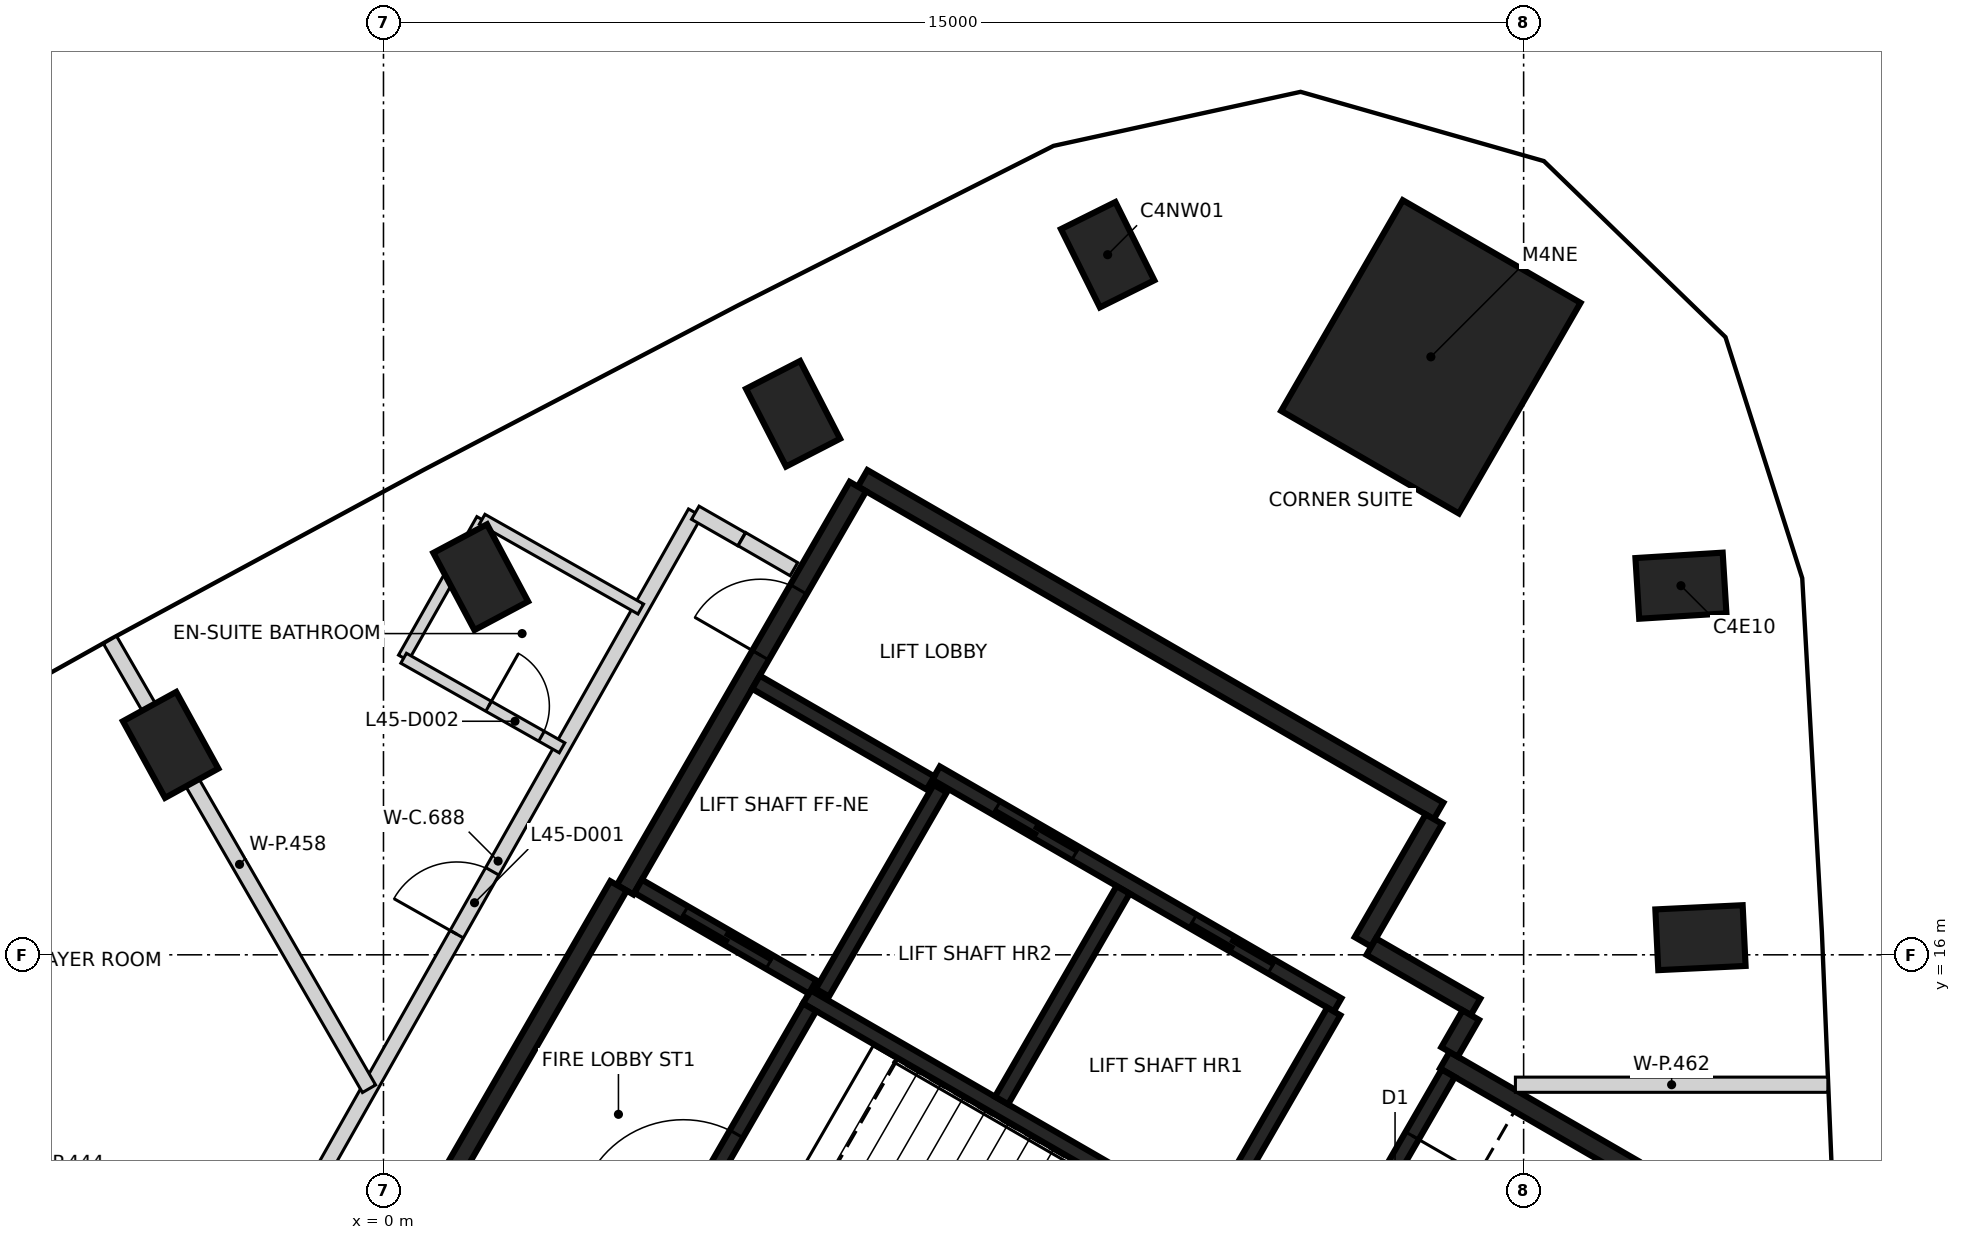
"""IFC4 building model, lengths in metres.
Left out: names, types, materials, properties, quantities, classifications, styles, units other than length and angle.
Written with IfcOpenShell. Run it as: python <this file> out.ifc"""

import sys

from ifc_helpers import new_model, si_unit, direction, frame, frame_2d, origin, origin_2d, place, context, subcontext, project, spatial, rectangle, extrude, element, fill, save


model = new_model("IFC4")
c1 = context("Model", 3, precision=1e-05, world=origin(), true_north=direction((0.0, 1.0)))
c2 = subcontext(c1, "Body", "Model", "MODEL_VIEW")
j1 = project(units=[si_unit("LENGTHUNIT", "METRE"), si_unit("PLANEANGLEUNIT", "RADIAN")], contexts=[c1])
p1 = place(None, origin())
s1 = spatial("IfcSite", under=j1, at=p1, CompositionType="ELEMENT")
p2 = place(p1, origin())
s2 = spatial("IfcBuilding", under=s1, at=p2, CompositionType="ELEMENT")
p3 = place(p2, frame((0.0, 0.0, 182.8)))
s3 = spatial("IfcBuildingStorey", under=s2, at=p3, CompositionType="ELEMENT", Elevation=182.8)
for number, where, z_axis, x_axis in (
    (1, (17.326, 16.226, -0.35), (0.0, 0.0, 1.0), (0.999, 0.048, 0.0)),
    (2, (17.07, 20.856, -0.35), (0.0, 0.0, 1.0), (0.998, 0.062, 0.0)),
    (3, (9.527, 25.211, -0.35), (0.0, 0.0, 1.0), (-0.445, 0.895, 0.0)),
    (4, (5.388, 23.118, -0.35), (0.0, 0.0, 1.0), (-0.458, 0.889, 0.0)),
    (5, (1.279, 20.968, -0.35), (0.0, 0.0, 1.0), (-0.47, 0.883, 0.0)),
    (6, (-2.8, 18.762, -0.35), (0.0, 0.0, 1.0), (-0.482, 0.876, 0.0)),
):
    element("IfcColumn", number, at=place(p3, frame(where, z_axis=z_axis, x_axis=x_axis)), inside=s3, PredefinedType="COLUMN", context=c2, shape_type="SweptSolid", body=[
        extrude(rectangle(XDim=1.15, YDim=0.8, at=origin_2d()), origin(), (0.0, 0.0, 1.0), 3.6),
    ])
p4 = place(p3, frame((13.78, 23.867, -0.35), z_axis=(0.0, 0.0, 1.0), x_axis=(0.5, 0.866025403784, 0.0)))
e7 = element("IfcColumn", 7, at=p4, inside=s3, PredefinedType="COLUMN", context=c2, shape_type="SweptSolid", body=[
    extrude(rectangle(XDim=3.2, YDim=2.7, at=origin_2d()), origin(), (0.0, 0.0, 1.0), 3.6),
])
p5 = place(p3, frame((6.304, 22.269, 0.0), z_axis=(0.0, 0.0, 1.0), x_axis=(0.866022959057, -0.500004234368, 0.0)))
e8 = element("IfcWall", 8, at=p5, inside=s3, PredefinedType="SHEAR", context=c2, shape_type="SweptSolid", body=[
    extrude(rectangle(XDim=8.75, YDim=0.25, at=frame_2d((4.375, 0.0))), origin(), (0.0, 0.0, 1.0), 3.25),
])
p6 = place(p3, frame((3.179, 16.856, 0.0), z_axis=(0.0, 0.0, 1.0), x_axis=(0.500001955336, 0.866024274868, 0.0)))
e9 = element("IfcWall", 9, at=p6, inside=s3, PredefinedType="SHEAR", context=c2, shape_type="SweptSolid", body=[
    extrude(rectangle(XDim=6.125, YDim=0.25, at=frame_2d((3.062, 0.0))), origin(), (0.0, 0.0, 1.0), 3.25),
])
p7 = place(p6, frame((3.563, 0.0, 0.0)))
e10 = element("IfcOpeningElement", 10, at=p7, cuts=e9, PredefinedType="OPENING", context=c2, shape_type="SweptSolid", body=[
    extrude(rectangle(XDim=1.0, YDim=2.1, at=frame_2d((0.5, 1.05))), frame((0.0, 0.135, 0.0), z_axis=(0.0, -1.0, 0.0), x_axis=(1.0, 0.0, 0.0)), (0.0, 0.0, 1.0), 0.27),
])
p8 = place(p3, frame((0.48, 12.381, 0.0), z_axis=(0.0, 0.0, 1.0), x_axis=(0.49999885962, 0.866026062182, 0.0)))
e11 = element("IfcWall", 11, at=p8, inside=s3, PredefinedType="SHEAR", context=c2, shape_type="SweptSolid", body=[
    extrude(rectangle(XDim=5.225, YDim=0.25, at=frame_2d((2.612, 0.0))), origin(), (0.0, 0.0, 1.0), 3.25),
])
p9 = place(p3, frame((13.963, 14.614, 0.0), z_axis=(0.0, 0.0, 1.0), x_axis=(0.866042235819, -0.499970844928, 0.0)))
e12 = element("IfcWall", 12, at=p9, inside=s3, PredefinedType="SHEAR", context=c2, shape_type="SweptSolid", body=[
    extrude(rectangle(XDim=2.865, YDim=0.25, at=frame_2d((1.432, 0.0))), origin(), (0.0, 0.0, 1.0), 3.25),
])
p10 = place(p3, frame((13.819, 17.785, 0.0), z_axis=(0.0, 0.0, 1.0), x_axis=(-0.500039802285, -0.866002422705, 0.0)))
e13 = element("IfcWall", 13, at=p10, inside=s3, PredefinedType="SHEAR", context=c2, shape_type="SweptSolid", body=[
    extrude(rectangle(XDim=1.865, YDim=0.25, at=frame_2d((0.932, 0.0))), origin(), (0.0, 0.0, 1.0), 3.25),
])
p11 = place(p3, frame((12.995, 16.108, 0.0), z_axis=(0.0, 0.0, 1.0), x_axis=(0.866044474677, -0.49996696679, 0.0)))
e14 = element("IfcWall", 14, at=p11, inside=s3, PredefinedType="SHEAR", context=c2, shape_type="SweptSolid", body=[
    extrude(rectangle(XDim=1.584, YDim=0.25, at=frame_2d((0.792, 0.0))), origin(), (0.0, 0.0, 1.0), 3.25),
])
p12 = place(p3, frame((14.305, 15.207, 0.0), z_axis=(0.0, 0.0, 1.0), x_axis=(-0.499848422343, -0.866112899501, 0.0)))
e15 = element("IfcWall", 15, at=p12, inside=s3, PredefinedType="SHEAR", context=c2, shape_type="SweptSolid", body=[
    extrude(rectangle(XDim=0.559, YDim=0.25, at=frame_2d((0.28, 0.0))), origin(), (0.0, 0.0, 1.0), 3.25),
])
p13 = place(p3, frame((12.552, 15.342, 0.0), z_axis=(0.0, 0.0, 1.0), x_axis=(-0.866030299012, 0.499991521122, 0.0)))
e16 = element("IfcWall", 16, at=p13, inside=s3, PredefinedType="SHEAR", context=c2, shape_type="SweptSolid", body=[
    extrude(rectangle(XDim=6.1, YDim=0.2, at=frame_2d((3.05, 0.0))), origin(), (0.0, 0.0, 1.0), 3.25),
])
p14 = place(p13, frame((1.0, 0.0, 0.0)))
e17 = element("IfcOpeningElement", 17, at=p14, cuts=e16, PredefinedType="OPENING", context=c2, shape_type="SweptSolid", body=[
    extrude(rectangle(XDim=1.2, YDim=2.1, at=frame_2d((0.6, 1.05))), frame((0.0, 0.11, 0.0), z_axis=(0.0, -1.0, 0.0), x_axis=(1.0, 0.0, 0.0)), (0.0, 0.0, 1.0), 0.22),
])
p15 = place(p13, frame((3.982, 0.0, 0.0)))
e18 = element("IfcOpeningElement", 18, at=p15, cuts=e16, PredefinedType="OPENING", context=c2, shape_type="SweptSolid", body=[
    extrude(rectangle(XDim=1.2, YDim=2.1, at=frame_2d((0.6, 1.05))), frame((0.0, 0.11, 0.0), z_axis=(0.0, -1.0, 0.0), x_axis=(1.0, 0.0, 0.0)), (0.0, 0.0, 1.0), 0.22),
])
p16 = place(p3, frame((10.743, 12.46, 0.0), z_axis=(0.0, 0.0, 1.0), x_axis=(-0.866018848283, 0.500011354289, 0.0)))
e19 = element("IfcWall", 19, at=p16, inside=s3, PredefinedType="SHEAR", context=c2, shape_type="SweptSolid", body=[
    extrude(rectangle(XDim=5.974, YDim=0.2, at=frame_2d((2.987, 0.0))), origin(), (0.0, 0.0, 1.0), 3.25),
])
p17 = place(p3, frame((3.057, 10.895, 0.0), z_axis=(0.0, 0.0, 1.0), x_axis=(0.500027839223, 0.866009330205, 0.0)))
e20 = element("IfcWall", 20, at=p17, inside=s3, PredefinedType="SHEAR", context=c2, shape_type="SweptSolid", body=[
    extrude(rectangle(XDim=5.098, YDim=0.2, at=frame_2d((2.549, 0.0))), origin(), (0.0, 0.0, 1.0), 3.25),
])
p18 = place(p17, frame((1.774, 0.0, 0.0)))
e21 = element("IfcOpeningElement", 21, at=p18, cuts=e20, PredefinedType="OPENING", context=c2, shape_type="SweptSolid", body=[
    extrude(rectangle(XDim=1.4, YDim=2.1, at=frame_2d((0.7, 1.05))), frame((0.0, 0.11, 0.0), z_axis=(0.0, -1.0, 0.0), x_axis=(1.0, 0.0, 0.0)), (0.0, 0.0, 1.0), 0.22),
])
p19 = place(p3, frame((8.132, 14.084, 0.0), z_axis=(0.0, 0.0, 1.0), x_axis=(0.500030834389, 0.86600760081, 0.0)))
e22 = element("IfcWall", 22, at=p19, inside=s3, PredefinedType="SHEAR", context=c2, shape_type="SweptSolid", body=[
    extrude(rectangle(XDim=3.198, YDim=0.2, at=frame_2d((1.599, 0.0))), origin(), (0.0, 0.0, 1.0), 3.25),
])
p20 = place(p3, frame((14.008, 14.442, 0.0), z_axis=(0.0, 0.0, 1.0), x_axis=(-0.499986818241, -0.866033014143, 0.0)))
e23 = element("IfcWall", 23, at=p20, inside=s3, PredefinedType="SHEAR", context=c2, shape_type="SweptSolid", body=[
    extrude(rectangle(XDim=2.798, YDim=0.2, at=frame_2d((1.399, 0.0))), origin(), (0.0, 0.0, 1.0), 3.25),
])
p21 = place(p20, frame((0.949, 0.0, 0.0)))
e24 = element("IfcOpeningElement", 24, at=p21, cuts=e23, PredefinedType="OPENING", context=c2, shape_type="SweptSolid", body=[
    extrude(rectangle(XDim=0.9, YDim=2.1, at=frame_2d((0.45, 1.05))), frame((0.0, 0.11, 0.0), z_axis=(0.0, -1.0, 0.0), x_axis=(1.0, 0.0, 0.0)), (0.0, 0.0, 1.0), 0.22),
])
p22 = place(p3, frame((12.502, 15.255, 0.0), z_axis=(0.0, 0.0, 1.0), x_axis=(-0.499965018551, -0.866045599391, 0.0)))
e25 = element("IfcWall", 25, at=p22, inside=s3, PredefinedType="SHEAR", context=c2, shape_type="SweptSolid", body=[
    extrude(rectangle(XDim=2.759, YDim=0.2, at=frame_2d((1.379, 0.0))), origin(), (0.0, 0.0, 1.0), 3.25),
])
p23 = place(p3, frame((7.324, 18.187, 0.0), z_axis=(0.0, 0.0, 1.0), x_axis=(-0.499967891604, -0.866043940782, 0.0)))
e26 = element("IfcWall", 26, at=p23, inside=s3, PredefinedType="SHEAR", context=c2, shape_type="SweptSolid", body=[
    extrude(rectangle(XDim=3.1, YDim=0.2, at=frame_2d((1.55, 0.0))), origin(), (0.0, 0.0, 1.0), 3.25),
])
p24 = place(p3, frame((5.646, 15.576, 0.0), z_axis=(0.0, 0.0, 1.0), x_axis=(-0.866018407898, 0.500012117035, 0.0)))
e27 = element("IfcWall", 27, at=p24, inside=s3, PredefinedType="SHEAR", context=c2, shape_type="SweptSolid", body=[
    extrude(rectangle(XDim=2.651, YDim=0.2, at=frame_2d((1.325, 0.0))), origin(), (0.0, 0.0, 1.0), 3.25),
])
p25 = place(p24, frame((0.652, 0.0, 0.0)))
e28 = element("IfcOpeningElement", 28, at=p25, cuts=e27, PredefinedType="OPENING", context=c2, shape_type="SweptSolid", body=[
    extrude(rectangle(XDim=1.3, YDim=2.1, at=frame_2d((0.65, 1.05))), frame((0.0, 0.11, 0.0), z_axis=(0.0, -1.0, 0.0), x_axis=(1.0, 0.0, 0.0)), (0.0, 0.0, 1.0), 0.22),
])
p26 = place(p3, frame((7.196, 18.26, 0.0), z_axis=(0.0, 0.0, 1.0), x_axis=(-0.866018407898, 0.500012117035, 0.0)))
e29 = element("IfcWall", 29, at=p26, inside=s3, PredefinedType="SHEAR", context=c2, shape_type="SweptSolid", body=[
    extrude(rectangle(XDim=2.651, YDim=0.2, at=frame_2d((1.325, 0.0))), origin(), (0.0, 0.0, 1.0), 3.25),
])
p27 = place(p3, frame((-1.084, 12.65, 0.0), z_axis=(0.0, 0.0, 1.0), x_axis=(0.492271892014, 0.870441488173, 0.0)))
e30 = element("IfcWall", 30, at=p27, inside=s3, PredefinedType="PARTITIONING", context=c2, shape_type="SweptSolid", body=[
    extrude(rectangle(XDim=10.531, YDim=0.2, at=frame_2d((5.266, 0.0))), origin(), (0.0, 0.0, 1.0), 3.25),
])
p28 = place(p27, frame((4.161, 0.0, 0.0)))
e31 = element("IfcOpeningElement", 31, at=p28, cuts=e30, PredefinedType="OPENING", context=c2, shape_type="SweptSolid", body=[
    extrude(rectangle(XDim=0.95, YDim=2.1, at=frame_2d((0.475, 1.05))), frame((0.0, 0.11, 0.0), z_axis=(0.0, -1.0, 0.0), x_axis=(1.0, 0.0, 0.0)), (0.0, 0.0, 1.0), 0.22),
])
p29 = place(p3, frame((4.102, 21.816, 0.0), z_axis=(0.0, 0.0, 1.0), x_axis=(0.867664502326, -0.497150189986, 0.0)))
e32 = element("IfcWall", 32, at=p29, inside=s3, PredefinedType="PARTITIONING", context=c2, shape_type="SweptSolid", body=[
    extrude(rectangle(XDim=0.702, YDim=0.2, at=frame_2d((0.351, 0.0))), origin(), (0.0, 0.0, 1.0), 3.25),
])
p30 = place(p3, frame((4.716, 21.468, 0.0), z_axis=(0.0, 0.0, 1.0), x_axis=(0.865912682783, -0.500195187698, 0.0)))
e33 = element("IfcWall", 33, at=p30, inside=s3, PredefinedType="PARTITIONING", context=c2, shape_type="SweptSolid", body=[
    extrude(rectangle(XDim=0.79, YDim=0.2, at=frame_2d((0.395, 0.0))), origin(), (0.0, 0.0, 1.0), 3.25),
])
p31 = place(p3, frame((-7.646, 17.879, 0.0), z_axis=(0.0, 0.0, 1.0), x_axis=(0.500047691386, -0.865997867399, 0.0)))
e34 = element("IfcWall", 34, at=p31, inside=s3, PredefinedType="PARTITIONING", context=c2, shape_type="SweptSolid", body=[
    extrude(rectangle(XDim=11.306, YDim=0.2, at=frame_2d((5.653, 0.0))), origin(), (0.0, 0.0, 1.0), 3.25),
])
p32 = place(p3, frame((-3.597, 20.142, 0.0), z_axis=(0.0, 0.0, 1.0), x_axis=(0.499864035625, -0.866103888623, 0.0)))
e35 = element("IfcWall", 35, at=p32, inside=s3, PredefinedType="PARTITIONING", context=c2, shape_type="SweptSolid", body=[
    extrude(rectangle(XDim=6.817, YDim=0.2, at=frame_2d((3.408, 0.0))), origin(), (0.0, 0.0, 1.0), 3.25),
])
p33 = place(p3, frame((14.892, 14.291, 0.0), z_axis=(0.0, 0.0, 1.0), x_axis=(1.0, 0.0, 0.0)))
e36 = element("IfcWall", 36, at=p33, inside=s3, PredefinedType="PARTITIONING", context=c2, shape_type="SweptSolid", body=[
    extrude(rectangle(XDim=4.111, YDim=0.2, at=frame_2d((2.055, 0.0))), origin(), (0.0, 0.0, 1.0), 2.35),
])
p34 = place(p3, frame((0.263, 19.906, 0.0), z_axis=(0.0, 0.0, 1.0), x_axis=(0.492479898936, 0.870323818555, 0.0)))
e37 = element("IfcWall", 37, at=p34, inside=s3, PredefinedType="PARTITIONING", context=c2, shape_type="SweptSolid", body=[
    extrude(rectangle(XDim=2.094, YDim=0.15, at=frame_2d((1.047, 0.0))), origin(), (0.0, 0.0, 1.0), 2.35),
])
p35 = place(p3, frame((0.265, 19.902, 0.0), z_axis=(0.0, 0.0, 1.0), x_axis=(0.870355792391, -0.492423389627, 0.0)))
e38 = element("IfcWall", 38, at=p35, inside=s3, PredefinedType="PARTITIONING", context=c2, shape_type="SweptSolid", body=[
    extrude(rectangle(XDim=2.395, YDim=0.15, at=frame_2d((1.197, 0.0))), origin(), (0.0, 0.0, 1.0), 3.25),
])
p36 = place(p35, frame((1.284, 0.0, 0.0)))
e39 = element("IfcOpeningElement", 39, at=p36, cuts=e38, PredefinedType="OPENING", context=c2, shape_type="SweptSolid", body=[
    extrude(rectangle(XDim=0.8, YDim=2.1, at=frame_2d((0.4, 1.05))), frame((0.0, 0.085, 0.0), z_axis=(0.0, -1.0, 0.0), x_axis=(1.0, 0.0, 0.0)), (0.0, 0.0, 1.0), 0.17),
])
p37 = place(p3, frame((1.298, 21.73, 0.0), z_axis=(0.0, 0.0, 1.0), x_axis=(0.870321906411, -0.492483278113, 0.0)))
e40 = element("IfcWall", 40, at=p37, inside=s3, PredefinedType="PARTITIONING", context=c2, shape_type="SweptSolid", body=[
    extrude(rectangle(XDim=2.398, YDim=0.15, at=frame_2d((1.199, 0.0))), origin(), (0.0, 0.0, 1.0), 2.35),
])
p38 = place(p25, origin())
e41 = element("IfcDoor", 41, at=p38, inside=s3, OperationType="SLIDING_TO_RIGHT", PredefinedType="DOOR", context=c2, shape_type="SweptSolid", body=[
    extrude(rectangle(XDim=1.3, YDim=2.1, at=frame_2d((0.65, 1.05))), frame((0.0, 0.025, 0.0), z_axis=(0.0, -1.0, 0.0), x_axis=(1.0, 0.0, 0.0)), (0.0, 0.0, 1.0), 0.05),
])
fill(e28, e41)
p39 = place(p14, origin())
e42 = element("IfcDoor", 42, at=p39, inside=s3, OperationType="DOUBLE_DOOR_SLIDING", PredefinedType="DOOR", context=c2, shape_type="SweptSolid", body=[
    extrude(rectangle(XDim=1.2, YDim=2.1, at=frame_2d((0.6, 1.05))), frame((0.0, 0.025, 0.0), z_axis=(0.0, -1.0, 0.0), x_axis=(1.0, 0.0, 0.0)), (0.0, 0.0, 1.0), 0.05),
])
fill(e17, e42)
p40 = place(p15, origin())
e43 = element("IfcDoor", 43, at=p40, inside=s3, OperationType="DOUBLE_DOOR_SLIDING", PredefinedType="DOOR", context=c2, shape_type="SweptSolid", body=[
    extrude(rectangle(XDim=1.2, YDim=2.1, at=frame_2d((0.6, 1.05))), frame((0.0, 0.025, 0.0), z_axis=(0.0, -1.0, 0.0), x_axis=(1.0, 0.0, 0.0)), (0.0, 0.0, 1.0), 0.05),
])
fill(e18, e43)
p41 = place(p7, origin())
e44 = element("IfcDoor", 44, at=p41, inside=s3, OperationType="SINGLE_SWING_LEFT", PredefinedType="DOOR", context=c2, shape_type="SweptSolid", body=[
    extrude(rectangle(XDim=1.0, YDim=2.1, at=frame_2d((0.5, 1.05))), frame((0.0, 0.025, 0.0), z_axis=(0.0, -1.0, 0.0), x_axis=(1.0, 0.0, 0.0)), (0.0, 0.0, 1.0), 0.05),
])
fill(e10, e44)
p42 = place(p18, origin())
e45 = element("IfcDoor", 45, at=p42, inside=s3, OperationType="SINGLE_SWING_RIGHT", PredefinedType="DOOR", context=c2, shape_type="SweptSolid", body=[
    extrude(rectangle(XDim=1.4, YDim=2.1, at=frame_2d((0.7, 1.05))), frame((0.0, 0.025, 0.0), z_axis=(0.0, -1.0, 0.0), x_axis=(1.0, 0.0, 0.0)), (0.0, 0.0, 1.0), 0.05),
])
fill(e21, e45)
p43 = place(p21, origin())
e46 = element("IfcDoor", 46, at=p43, inside=s3, OperationType="SINGLE_SWING_LEFT", PredefinedType="DOOR", context=c2, shape_type="SweptSolid", body=[
    extrude(rectangle(XDim=0.9, YDim=2.1, at=frame_2d((0.45, 1.05))), frame((0.0, 0.025, 0.0), z_axis=(0.0, -1.0, 0.0), x_axis=(1.0, 0.0, 0.0)), (0.0, 0.0, 1.0), 0.05),
])
fill(e24, e46)
p44 = place(p28, frame((0.95, 0.0, 0.0), z_axis=(0.0, 0.0, 1.0), x_axis=(-1.0, 0.0, 0.0)))
e47 = element("IfcDoor", 47, at=p44, inside=s3, OperationType="SINGLE_SWING_LEFT", PredefinedType="DOOR", context=c2, shape_type="SweptSolid", body=[
    extrude(rectangle(XDim=0.95, YDim=2.1, at=frame_2d((0.475, 1.05))), frame((0.0, 0.025, 0.0), z_axis=(0.0, -1.0, 0.0), x_axis=(1.0, 0.0, 0.0)), (0.0, 0.0, 1.0), 0.05),
])
fill(e31, e47)
p45 = place(p36, origin())
e48 = element("IfcDoor", 48, at=p45, inside=s3, OperationType="SINGLE_SWING_LEFT", PredefinedType="DOOR", context=c2, shape_type="SweptSolid", body=[
    extrude(rectangle(XDim=0.8, YDim=2.1, at=frame_2d((0.4, 1.05))), frame((0.0, 0.025, 0.0), z_axis=(0.0, -1.0, 0.0), x_axis=(1.0, 0.0, 0.0)), (0.0, 0.0, 1.0), 0.05),
])
fill(e39, e48)
save(model, sys.argv[1])
